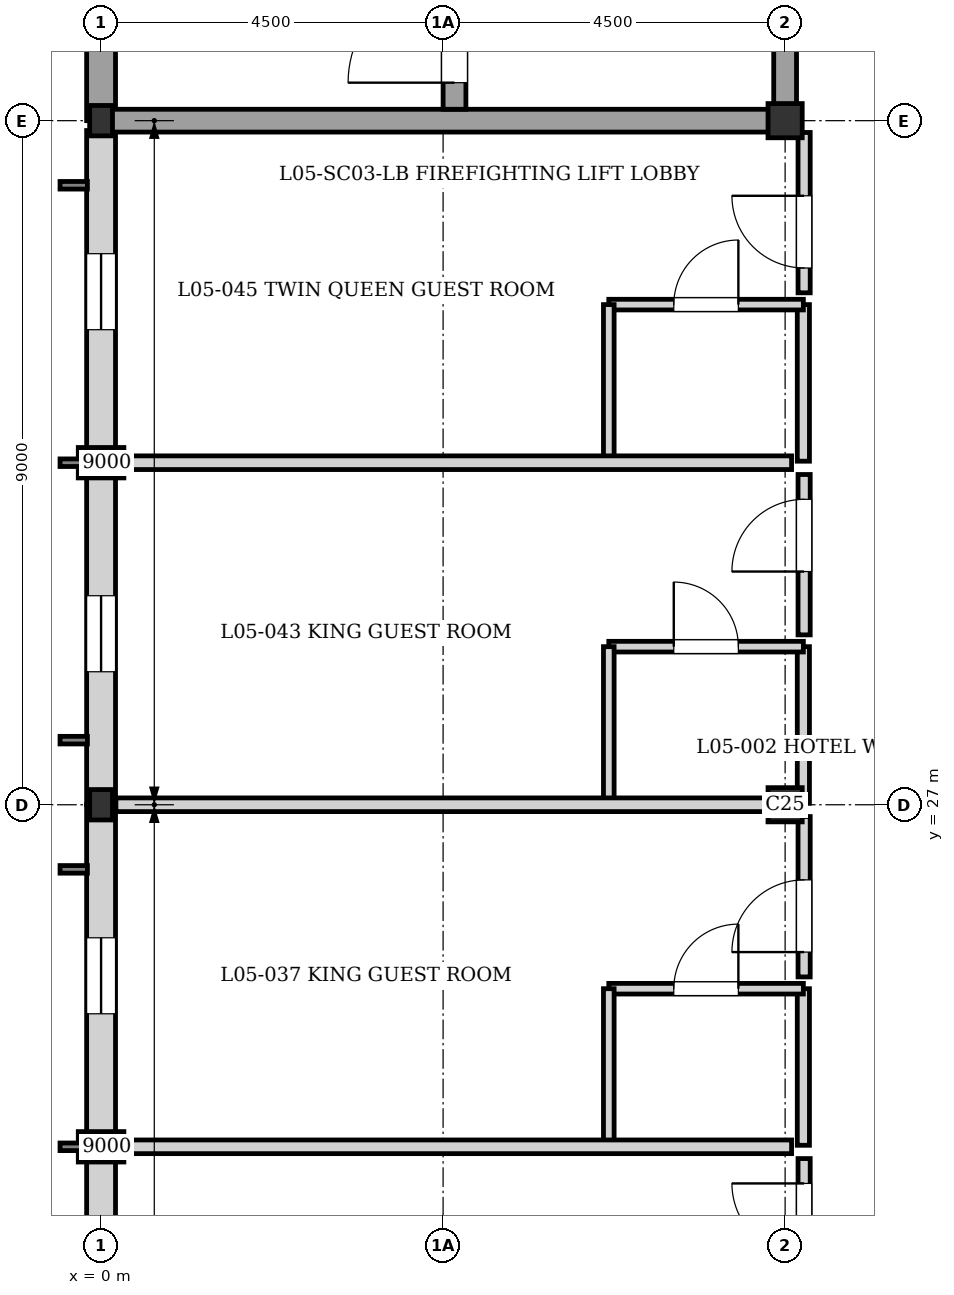
"""IFC4 building model, lengths in metres.
Left out: names, types, materials, properties, quantities, classifications, styles, units other than length and angle.
Written with IfcOpenShell. Run it as: python <this file> out.ifc"""

import sys

from ifc_helpers import new_model, si_unit, direction, frame, frame_2d, origin, origin_2d, place, context, subcontext, project, spatial, rectangle, i_section, extrude, element, fill, save


model = new_model("IFC4")
c1 = context("Model", 3, precision=1e-05, world=origin(), true_north=direction((0.0, 1.0)))
c2 = subcontext(c1, "Body", "Model", "MODEL_VIEW")
j1 = project(units=[si_unit("LENGTHUNIT", "METRE"), si_unit("PLANEANGLEUNIT", "RADIAN")], contexts=[c1])
p1 = place(None, origin())
s1 = spatial("IfcSite", under=j1, at=p1, CompositionType="ELEMENT")
p2 = place(p1, origin())
s2 = spatial("IfcBuilding", under=s1, at=p2, CompositionType="ELEMENT")
p3 = place(p2, frame((0.0, 0.0, 17.6)))
s3 = spatial("IfcBuildingStorey", under=s2, at=p3, CompositionType="ELEMENT", Elevation=17.6)
for number, where, z_axis, x_axis in (
    (1, (0.0, 27.0, 0.0), (0.0, 0.0, 1.0), (1.0, 0.0, 0.0)),
    (2, (0.0, 36.0, 0.0), (0.0, 0.0, 1.0), (1.0, 0.0, 0.0)),
):
    element("IfcColumn", number, at=place(p3, frame(where, z_axis=z_axis, x_axis=x_axis)), inside=s3, PredefinedType="COLUMN", context=c2, shape_type="SweptSolid", body=[
        extrude(i_section(OverallWidth=0.3, OverallDepth=0.4, WebThickness=0.013, FlangeThickness=0.024, at=origin_2d()), origin(), (0.0, 0.0, 1.0), 3.04),
    ])
for number, where, z_axis, x_axis in (
    (3, (9.0, 27.0, 0.0), (0.0, 0.0, 1.0), (1.0, 0.0, 0.0)),
    (4, (9.0, 36.0, 0.0), (0.0, 0.0, 1.0), (1.0, 0.0, 0.0)),
):
    element("IfcColumn", number, at=place(p3, frame(where, z_axis=z_axis, x_axis=x_axis)), inside=s3, PredefinedType="COLUMN", context=c2, shape_type="SweptSolid", body=[
        extrude(rectangle(XDim=0.45, YDim=0.45, at=origin_2d()), origin(), (0.0, 0.0, 1.0), 3.04),
    ])
for number, where, z_axis, x_axis in (
    (5, (0.0, 22.5, 0.0), (0.0, 0.0, 1.0), (0.0, 1.0, 0.0)),
    (6, (0.0, 31.5, 0.0), (0.0, 0.0, 1.0), (0.0, 1.0, 0.0)),
):
    element("IfcColumn", number, at=place(p3, frame(where, z_axis=z_axis, x_axis=x_axis)), inside=s3, PredefinedType="PILASTER", context=c2, shape_type="SweptSolid", body=[
        extrude(rectangle(XDim=0.4, YDim=0.6, at=origin_2d()), origin(), (0.0, 0.0, 1.0), 3.04),
    ])
p4 = place(p3, frame((0.0, 18.0, 0.0), z_axis=(0.0, 0.0, 1.0), x_axis=(0.0, 1.0, 0.0)))
e7 = element("IfcWall", 7, at=p4, inside=s3, PredefinedType="SOLIDWALL", context=c2, shape_type="SweptSolid", body=[
    extrude(rectangle(XDim=9.0, YDim=0.38, at=frame_2d((4.5, 0.0))), origin(), (0.0, 0.0, 1.0), 2.42),
])
p5 = place(p4, frame((1.75, 0.0, 0.35)))
e8 = element("IfcOpeningElement", 8, at=p5, cuts=e7, PredefinedType="OPENING", context=c2, shape_type="SweptSolid", body=[
    extrude(rectangle(XDim=1.0, YDim=1.6, at=frame_2d((0.5, 0.8))), frame((0.0, 0.2, 0.0), z_axis=(0.0, -1.0, 0.0), x_axis=(1.0, 0.0, 0.0)), (0.0, 0.0, 1.0), 0.4),
])
p6 = place(p4, frame((6.25, 0.0, 0.35)))
e9 = element("IfcOpeningElement", 9, at=p6, cuts=e7, PredefinedType="OPENING", context=c2, shape_type="SweptSolid", body=[
    extrude(rectangle(XDim=1.0, YDim=1.6, at=frame_2d((0.5, 0.8))), frame((0.0, 0.2, 0.0), z_axis=(0.0, -1.0, 0.0), x_axis=(1.0, 0.0, 0.0)), (0.0, 0.0, 1.0), 0.4),
])
p7 = place(p3, frame((0.0, 27.0, 0.0), z_axis=(0.0, 0.0, 1.0), x_axis=(0.0, 1.0, 0.0)))
e10 = element("IfcWall", 10, at=p7, inside=s3, PredefinedType="SOLIDWALL", context=c2, shape_type="SweptSolid", body=[
    extrude(rectangle(XDim=8.87, YDim=0.38, at=frame_2d((4.435, 0.0))), origin(), (0.0, 0.0, 1.0), 2.38),
])
p8 = place(p7, frame((1.75, 0.0, 0.35)))
e11 = element("IfcOpeningElement", 11, at=p8, cuts=e10, PredefinedType="OPENING", context=c2, shape_type="SweptSolid", body=[
    extrude(rectangle(XDim=1.0, YDim=1.6, at=frame_2d((0.5, 0.8))), frame((0.0, 0.2, 0.0), z_axis=(0.0, -1.0, 0.0), x_axis=(1.0, 0.0, 0.0)), (0.0, 0.0, 1.0), 0.4),
])
p9 = place(p7, frame((6.25, 0.0, 0.35)))
e12 = element("IfcOpeningElement", 12, at=p9, cuts=e10, PredefinedType="OPENING", context=c2, shape_type="SweptSolid", body=[
    extrude(rectangle(XDim=1.0, YDim=1.6, at=frame_2d((0.5, 0.8))), frame((0.0, 0.2, 0.0), z_axis=(0.0, -1.0, 0.0), x_axis=(1.0, 0.0, 0.0)), (0.0, 0.0, 1.0), 0.4),
])
p10 = place(p3, frame((0.0, 36.0, 0.0), z_axis=(0.0, 0.0, 1.0), x_axis=(0.0, 1.0, 0.0)))
e13 = element("IfcWall", 13, at=p10, inside=s3, PredefinedType="SOLIDWALL", context=c2, shape_type="SweptSolid", body=[
    extrude(rectangle(XDim=9.0, YDim=0.38, at=frame_2d((4.5, 0.0))), origin(), (0.0, 0.0, 1.0), 2.82),
])
p11 = place(p3, frame((0.0, 36.0, 0.0), z_axis=(0.0, 0.0, 1.0), x_axis=(1.0, 0.0, 0.0)))
e14 = element("IfcWall", 14, at=p11, inside=s3, PredefinedType="SHEAR", context=c2, shape_type="SweptSolid", body=[
    extrude(rectangle(XDim=9.0, YDim=0.3, at=frame_2d((4.5, 0.0))), origin(), (0.0, 0.0, 1.0), 2.82),
])
p12 = place(p3, frame((9.0, 36.0, 0.0), z_axis=(0.0, 0.0, 1.0), x_axis=(0.0, 1.0, 0.0)))
e15 = element("IfcWall", 15, at=p12, inside=s3, PredefinedType="SHEAR", context=c2, shape_type="SweptSolid", body=[
    extrude(rectangle(XDim=9.0, YDim=0.3, at=frame_2d((4.5, 0.0))), origin(), (0.0, 0.0, 1.0), 2.82),
])
p13 = place(p12, frame((2.05, 0.0, 0.0)))
e16 = element("IfcOpeningElement", 16, at=p13, cuts=e15, PredefinedType="OPENING", context=c2, shape_type="SweptSolid", body=[
    extrude(rectangle(XDim=1.4, YDim=2.02, at=frame_2d((0.7, 1.01))), frame((0.0, 0.16, 0.0), z_axis=(0.0, -1.0, 0.0), x_axis=(1.0, 0.0, 0.0)), (0.0, 0.0, 1.0), 0.32),
])
p14 = place(p3, frame((4.65, 36.15, 0.0), z_axis=(0.0, 0.0, 1.0), x_axis=(0.0, 1.0, 0.0)))
e17 = element("IfcWall", 17, at=p14, inside=s3, PredefinedType="SHEAR", context=c2, shape_type="SweptSolid", body=[
    extrude(rectangle(XDim=8.7, YDim=0.3, at=frame_2d((4.35, 0.0))), origin(), (0.0, 0.0, 1.0), 2.82),
])
p15 = place(p14, frame((0.35, 0.0, 0.0)))
e18 = element("IfcOpeningElement", 18, at=p15, cuts=e17, PredefinedType="OPENING", context=c2, shape_type="SweptSolid", body=[
    extrude(rectangle(XDim=1.4, YDim=2.02, at=frame_2d((0.7, 1.01))), frame((0.0, 0.16, 0.0), z_axis=(0.0, -1.0, 0.0), x_axis=(1.0, 0.0, 0.0)), (0.0, 0.0, 1.0), 0.32),
])
p16 = place(p3, frame((9.24, 22.52, 0.0), z_axis=(0.0, 0.0, 1.0), x_axis=(0.0, 1.0, 0.0)))
e19 = element("IfcWall", 19, at=p16, inside=s3, PredefinedType="PARTITIONING", context=c2, shape_type="SweptSolid", body=[
    extrude(rectangle(XDim=2.06, YDim=0.16, at=frame_2d((1.03, 0.0))), origin(), (0.0, 0.0, 1.0), 2.82),
])
p17 = place(p3, frame((6.68, 24.58, 0.0), z_axis=(0.0, 0.0, 1.0), x_axis=(1.0, 0.0, 0.0)))
e20 = element("IfcWall", 20, at=p17, inside=s3, PredefinedType="PLUMBINGWALL", context=c2, shape_type="SweptSolid", body=[
    extrude(rectangle(XDim=2.56, YDim=0.14, at=frame_2d((1.28, 0.0))), origin(), (0.0, 0.0, 1.0), 2.82),
])
p18 = place(p17, frame((0.855, 0.0, 0.0)))
e21 = element("IfcOpeningElement", 21, at=p18, cuts=e20, PredefinedType="OPENING", context=c2, shape_type="SweptSolid", body=[
    extrude(rectangle(XDim=0.85, YDim=2.04, at=frame_2d((0.425, 1.02))), frame((0.0, 0.08, 0.0), z_axis=(0.0, -1.0, 0.0), x_axis=(1.0, 0.0, 0.0)), (0.0, 0.0, 1.0), 0.16),
])
p19 = place(p3, frame((6.68, 22.52, 0.0), z_axis=(0.0, 0.0, 1.0), x_axis=(0.0, 1.0, 0.0)))
e22 = element("IfcWall", 22, at=p19, inside=s3, PredefinedType="PLUMBINGWALL", context=c2, shape_type="SweptSolid", body=[
    extrude(rectangle(XDim=2.06, YDim=0.14, at=frame_2d((1.03, 0.0))), origin(), (0.0, 0.0, 1.0), 2.82),
])
p20 = place(p3, frame((9.24, 27.02, 0.0), z_axis=(0.0, 0.0, 1.0), x_axis=(0.0, 1.0, 0.0)))
e23 = element("IfcWall", 23, at=p20, inside=s3, PredefinedType="PARTITIONING", context=c2, shape_type="SweptSolid", body=[
    extrude(rectangle(XDim=2.06, YDim=0.16, at=frame_2d((1.03, 0.0))), origin(), (0.0, 0.0, 1.0), 2.82),
])
p21 = place(p3, frame((6.68, 29.08, 0.0), z_axis=(0.0, 0.0, 1.0), x_axis=(1.0, 0.0, 0.0)))
e24 = element("IfcWall", 24, at=p21, inside=s3, PredefinedType="PLUMBINGWALL", context=c2, shape_type="SweptSolid", body=[
    extrude(rectangle(XDim=2.56, YDim=0.14, at=frame_2d((1.28, 0.0))), origin(), (0.0, 0.0, 1.0), 2.82),
])
p22 = place(p21, frame((0.855, 0.0, 0.0)))
e25 = element("IfcOpeningElement", 25, at=p22, cuts=e24, PredefinedType="OPENING", context=c2, shape_type="SweptSolid", body=[
    extrude(rectangle(XDim=0.85, YDim=2.04, at=frame_2d((0.425, 1.02))), frame((0.0, 0.08, 0.0), z_axis=(0.0, -1.0, 0.0), x_axis=(1.0, 0.0, 0.0)), (0.0, 0.0, 1.0), 0.16),
])
p23 = place(p3, frame((6.68, 27.02, 0.0), z_axis=(0.0, 0.0, 1.0), x_axis=(0.0, 1.0, 0.0)))
e26 = element("IfcWall", 26, at=p23, inside=s3, PredefinedType="PLUMBINGWALL", context=c2, shape_type="SweptSolid", body=[
    extrude(rectangle(XDim=2.06, YDim=0.14, at=frame_2d((1.03, 0.0))), origin(), (0.0, 0.0, 1.0), 2.82),
])
p24 = place(p3, frame((9.24, 31.52, 0.0), z_axis=(0.0, 0.0, 1.0), x_axis=(0.0, 1.0, 0.0)))
e27 = element("IfcWall", 27, at=p24, inside=s3, PredefinedType="PARTITIONING", context=c2, shape_type="SweptSolid", body=[
    extrude(rectangle(XDim=2.06, YDim=0.16, at=frame_2d((1.03, 0.0))), origin(), (0.0, 0.0, 1.0), 2.82),
])
p25 = place(p3, frame((6.68, 33.58, 0.0), z_axis=(0.0, 0.0, 1.0), x_axis=(1.0, 0.0, 0.0)))
e28 = element("IfcWall", 28, at=p25, inside=s3, PredefinedType="PLUMBINGWALL", context=c2, shape_type="SweptSolid", body=[
    extrude(rectangle(XDim=2.56, YDim=0.14, at=frame_2d((1.28, 0.0))), origin(), (0.0, 0.0, 1.0), 2.82),
])
p26 = place(p25, frame((0.855, 0.0, 0.0)))
e29 = element("IfcOpeningElement", 29, at=p26, cuts=e28, PredefinedType="OPENING", context=c2, shape_type="SweptSolid", body=[
    extrude(rectangle(XDim=0.85, YDim=2.04, at=frame_2d((0.425, 1.02))), frame((0.0, 0.08, 0.0), z_axis=(0.0, -1.0, 0.0), x_axis=(1.0, 0.0, 0.0)), (0.0, 0.0, 1.0), 0.16),
])
p27 = place(p3, frame((6.68, 31.52, 0.0), z_axis=(0.0, 0.0, 1.0), x_axis=(0.0, 1.0, 0.0)))
e30 = element("IfcWall", 30, at=p27, inside=s3, PredefinedType="PLUMBINGWALL", context=c2, shape_type="SweptSolid", body=[
    extrude(rectangle(XDim=2.06, YDim=0.14, at=frame_2d((1.03, 0.0))), origin(), (0.0, 0.0, 1.0), 2.82),
])
p28 = place(p3, frame((0.195, 22.5, 0.0), z_axis=(0.0, 0.0, 1.0), x_axis=(1.0, 0.0, 0.0)))
e31 = element("IfcWall", 31, at=p28, inside=s3, PredefinedType="PARTITIONING", context=c2, shape_type="SweptSolid", body=[
    extrude(rectangle(XDim=8.89, YDim=0.18, at=frame_2d((4.445, 0.0))), origin(), (0.0, 0.0, 1.0), 2.82),
])
p29 = place(p3, frame((0.195, 27.0, 0.0), z_axis=(0.0, 0.0, 1.0), x_axis=(1.0, 0.0, 0.0)))
e32 = element("IfcWall", 32, at=p29, inside=s3, PredefinedType="PARTITIONING", context=c2, shape_type="SweptSolid", body=[
    extrude(rectangle(XDim=8.89, YDim=0.18, at=frame_2d((4.445, 0.0))), origin(), (0.0, 0.0, 1.0), 2.34),
])
p30 = place(p3, frame((0.195, 31.5, 0.0), z_axis=(0.0, 0.0, 1.0), x_axis=(1.0, 0.0, 0.0)))
e33 = element("IfcWall", 33, at=p30, inside=s3, PredefinedType="PARTITIONING", context=c2, shape_type="SweptSolid", body=[
    extrude(rectangle(XDim=8.89, YDim=0.18, at=frame_2d((4.445, 0.0))), origin(), (0.0, 0.0, 1.0), 2.82),
])
p31 = place(p3, frame((9.25, 20.235, 0.0), z_axis=(0.0, 0.0, 1.0), x_axis=(0.0, 1.0, 0.0)))
e34 = element("IfcWall", 34, at=p31, inside=s3, PredefinedType="PARTITIONING", context=c2, shape_type="SweptSolid", body=[
    extrude(rectangle(XDim=2.11, YDim=0.16, at=frame_2d((1.055, 0.0))), origin(), (0.0, 0.0, 1.0), 2.82),
])
p32 = place(p31, frame((0.833, 0.0, 0.0)))
e35 = element("IfcOpeningElement", 35, at=p32, cuts=e34, PredefinedType="OPENING", context=c2, shape_type="SweptSolid", body=[
    extrude(rectangle(XDim=0.95, YDim=2.15, at=frame_2d((0.475, 1.075))), frame((0.0, 0.09, 0.0), z_axis=(0.0, -1.0, 0.0), x_axis=(1.0, 0.0, 0.0)), (0.0, 0.0, 1.0), 0.18),
])
p33 = place(p3, frame((9.25, 24.735, 0.0), z_axis=(0.0, 0.0, 1.0), x_axis=(0.0, 1.0, 0.0)))
e36 = element("IfcWall", 36, at=p33, inside=s3, PredefinedType="PARTITIONING", context=c2, shape_type="SweptSolid", body=[
    extrude(rectangle(XDim=2.11, YDim=0.16, at=frame_2d((1.055, 0.0))), origin(), (0.0, 0.0, 1.0), 2.82),
])
p34 = place(p33, frame((0.327, 0.0, 0.0)))
e37 = element("IfcOpeningElement", 37, at=p34, cuts=e36, PredefinedType="OPENING", context=c2, shape_type="SweptSolid", body=[
    extrude(rectangle(XDim=0.95, YDim=2.15, at=frame_2d((0.475, 1.075))), frame((0.0, 0.09, 0.0), z_axis=(0.0, -1.0, 0.0), x_axis=(1.0, 0.0, 0.0)), (0.0, 0.0, 1.0), 0.18),
])
p35 = place(p3, frame((9.25, 29.235, 0.0), z_axis=(0.0, 0.0, 1.0), x_axis=(0.0, 1.0, 0.0)))
e38 = element("IfcWall", 38, at=p35, inside=s3, PredefinedType="PARTITIONING", context=c2, shape_type="SweptSolid", body=[
    extrude(rectangle(XDim=2.11, YDim=0.16, at=frame_2d((1.055, 0.0))), origin(), (0.0, 0.0, 1.0), 2.82),
])
p36 = place(p35, frame((0.833, 0.0, 0.0)))
e39 = element("IfcOpeningElement", 39, at=p36, cuts=e38, PredefinedType="OPENING", context=c2, shape_type="SweptSolid", body=[
    extrude(rectangle(XDim=0.95, YDim=2.15, at=frame_2d((0.475, 1.075))), frame((0.0, 0.09, 0.0), z_axis=(0.0, -1.0, 0.0), x_axis=(1.0, 0.0, 0.0)), (0.0, 0.0, 1.0), 0.18),
])
p37 = place(p3, frame((9.25, 33.735, 0.0), z_axis=(0.0, 0.0, 1.0), x_axis=(0.0, 1.0, 0.0)))
e40 = element("IfcWall", 40, at=p37, inside=s3, PredefinedType="PARTITIONING", context=c2, shape_type="SweptSolid", body=[
    extrude(rectangle(XDim=2.11, YDim=0.16, at=frame_2d((1.055, 0.0))), origin(), (0.0, 0.0, 1.0), 2.82),
])
p38 = place(p37, frame((0.327, 0.0, 0.0)))
e41 = element("IfcOpeningElement", 41, at=p38, cuts=e40, PredefinedType="OPENING", context=c2, shape_type="SweptSolid", body=[
    extrude(rectangle(XDim=0.95, YDim=2.15, at=frame_2d((0.475, 1.075))), frame((0.0, 0.09, 0.0), z_axis=(0.0, -1.0, 0.0), x_axis=(1.0, 0.0, 0.0)), (0.0, 0.0, 1.0), 0.18),
])
p39 = place(p6, origin())
e42 = element("IfcWindow", 42, at=p39, inside=s3, PartitioningType="SINGLE_PANEL", PredefinedType="WINDOW", context=c2, shape_type="SweptSolid", body=[
    extrude(rectangle(XDim=1.0, YDim=1.6, at=frame_2d((0.5, 0.8))), frame((0.0, 0.03, 0.0), z_axis=(0.0, -1.0, 0.0), x_axis=(1.0, 0.0, 0.0)), (0.0, 0.0, 1.0), 0.06),
])
fill(e9, e42)
p40 = place(p8, origin())
e43 = element("IfcWindow", 43, at=p40, inside=s3, PartitioningType="SINGLE_PANEL", PredefinedType="WINDOW", context=c2, shape_type="SweptSolid", body=[
    extrude(rectangle(XDim=1.0, YDim=1.6, at=frame_2d((0.5, 0.8))), frame((0.0, 0.03, 0.0), z_axis=(0.0, -1.0, 0.0), x_axis=(1.0, 0.0, 0.0)), (0.0, 0.0, 1.0), 0.06),
])
fill(e11, e43)
p41 = place(p9, origin())
e44 = element("IfcWindow", 44, at=p41, inside=s3, PartitioningType="SINGLE_PANEL", PredefinedType="WINDOW", context=c2, shape_type="SweptSolid", body=[
    extrude(rectangle(XDim=1.0, YDim=1.6, at=frame_2d((0.5, 0.8))), frame((0.0, 0.03, 0.0), z_axis=(0.0, -1.0, 0.0), x_axis=(1.0, 0.0, 0.0)), (0.0, 0.0, 1.0), 0.06),
])
fill(e12, e44)
p42 = place(p15, origin())
e45 = element("IfcDoor", 45, at=p42, inside=s3, OperationType="SINGLE_SWING_LEFT", PredefinedType="DOOR", context=c2, shape_type="SweptSolid", body=[
    extrude(rectangle(XDim=1.4, YDim=2.02, at=frame_2d((0.7, 1.01))), frame((0.0, 0.025, 0.0), z_axis=(0.0, -1.0, 0.0), x_axis=(1.0, 0.0, 0.0)), (0.0, 0.0, 1.0), 0.05),
])
fill(e18, e45)
p43 = place(p18, origin())
e46 = element("IfcDoor", 46, at=p43, inside=s3, OperationType="SINGLE_SWING_RIGHT", PredefinedType="DOOR", context=c2, shape_type="SweptSolid", body=[
    extrude(rectangle(XDim=0.85, YDim=2.04, at=frame_2d((0.425, 1.02))), frame((0.0, 0.025, 0.0), z_axis=(0.0, -1.0, 0.0), x_axis=(1.0, 0.0, 0.0)), (0.0, 0.0, 1.0), 0.05),
])
fill(e21, e46)
p44 = place(p22, origin())
e47 = element("IfcDoor", 47, at=p44, inside=s3, OperationType="SINGLE_SWING_LEFT", PredefinedType="DOOR", context=c2, shape_type="SweptSolid", body=[
    extrude(rectangle(XDim=0.85, YDim=2.04, at=frame_2d((0.425, 1.02))), frame((0.0, 0.025, 0.0), z_axis=(0.0, -1.0, 0.0), x_axis=(1.0, 0.0, 0.0)), (0.0, 0.0, 1.0), 0.05),
])
fill(e25, e47)
p45 = place(p26, origin())
e48 = element("IfcDoor", 48, at=p45, inside=s3, OperationType="SINGLE_SWING_RIGHT", PredefinedType="DOOR", context=c2, shape_type="SweptSolid", body=[
    extrude(rectangle(XDim=0.85, YDim=2.04, at=frame_2d((0.425, 1.02))), frame((0.0, 0.025, 0.0), z_axis=(0.0, -1.0, 0.0), x_axis=(1.0, 0.0, 0.0)), (0.0, 0.0, 1.0), 0.05),
])
fill(e29, e48)
p46 = place(p32, origin())
e49 = element("IfcDoor", 49, at=p46, inside=s3, OperationType="SINGLE_SWING_RIGHT", PredefinedType="DOOR", context=c2, shape_type="SweptSolid", body=[
    extrude(rectangle(XDim=0.95, YDim=2.15, at=frame_2d((0.475, 1.075))), frame((0.0, 0.025, 0.0), z_axis=(0.0, -1.0, 0.0), x_axis=(1.0, 0.0, 0.0)), (0.0, 0.0, 1.0), 0.05),
])
fill(e35, e49)
p47 = place(p34, origin())
e50 = element("IfcDoor", 50, at=p47, inside=s3, OperationType="SINGLE_SWING_LEFT", PredefinedType="DOOR", context=c2, shape_type="SweptSolid", body=[
    extrude(rectangle(XDim=0.95, YDim=2.15, at=frame_2d((0.475, 1.075))), frame((0.0, 0.025, 0.0), z_axis=(0.0, -1.0, 0.0), x_axis=(1.0, 0.0, 0.0)), (0.0, 0.0, 1.0), 0.05),
])
fill(e37, e50)
p48 = place(p36, origin())
e51 = element("IfcDoor", 51, at=p48, inside=s3, OperationType="SINGLE_SWING_LEFT", PredefinedType="DOOR", context=c2, shape_type="SweptSolid", body=[
    extrude(rectangle(XDim=0.95, YDim=2.15, at=frame_2d((0.475, 1.075))), frame((0.0, 0.025, 0.0), z_axis=(0.0, -1.0, 0.0), x_axis=(1.0, 0.0, 0.0)), (0.0, 0.0, 1.0), 0.05),
])
fill(e39, e51)
p49 = place(p38, origin())
e52 = element("IfcDoor", 52, at=p49, inside=s3, OperationType="SINGLE_SWING_RIGHT", PredefinedType="DOOR", context=c2, shape_type="SweptSolid", body=[
    extrude(rectangle(XDim=0.95, YDim=2.15, at=frame_2d((0.475, 1.075))), frame((0.0, 0.025, 0.0), z_axis=(0.0, -1.0, 0.0), x_axis=(1.0, 0.0, 0.0)), (0.0, 0.0, 1.0), 0.05),
])
fill(e41, e52)
save(model, sys.argv[1])
